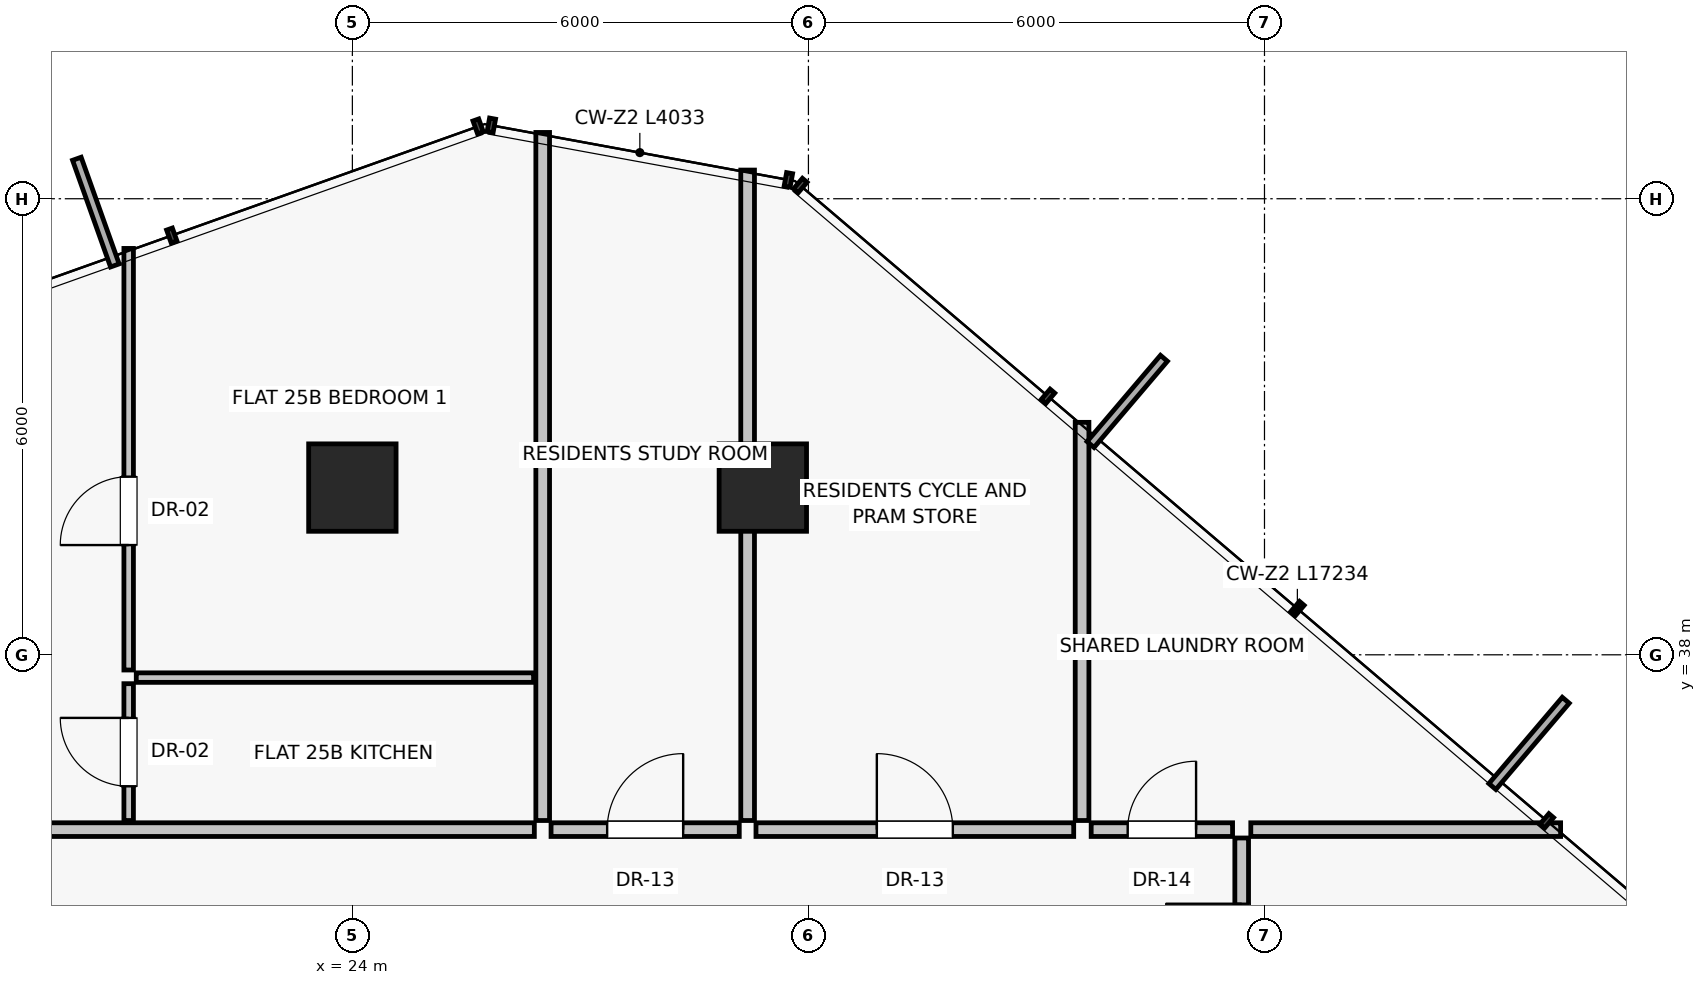
"""IFC4 building model, lengths in metres.
Left out: names, types, materials, properties, quantities, classifications, styles, units other than length and angle.
Written with IfcOpenShell. Run it as: python <this file> out.ifc"""

import sys

from ifc_helpers import new_model, si_unit, direction, frame, frame_2d, origin, origin_2d, place, context, subcontext, project, spatial, rectangle, extrude, source, transform, mapped, element, fill, save


model = new_model("IFC4")
c1 = context("Model", 3, precision=1e-05, world=origin(), true_north=direction((0.0, 1.0)))
c2 = subcontext(c1, "Body", "Model", "MODEL_VIEW")
j1 = project(units=[si_unit("LENGTHUNIT", "METRE"), si_unit("PLANEANGLEUNIT", "RADIAN")], contexts=[c1])
p1 = place(None, origin())
s1 = spatial("IfcSite", under=j1, at=p1, CompositionType="ELEMENT")
p2 = place(p1, origin())
s2 = spatial("IfcBuilding", under=s1, at=p2, CompositionType="ELEMENT")
p3 = place(p2, frame((0.0, 0.0, 92.7)))
s3 = spatial("IfcBuildingStorey", under=s2, at=p3, CompositionType="ELEMENT", Elevation=92.7)
for number, where, z_axis, x_axis in (
    (1, (29.4, 40.2, 0.0), (0.0, 0.0, 1.0), (1.0, 0.0, 0.0)),
    (2, (24.0, 40.2, 0.0), (0.0, 0.0, 1.0), (1.0, 0.0, 0.0)),
):
    element("IfcColumn", number, at=place(p3, frame(where, z_axis=z_axis, x_axis=x_axis)), inside=s3, PredefinedType="COLUMN", context=c2, shape_type="SweptSolid", body=[
        extrude(rectangle(XDim=1.15, YDim=1.15, at=origin_2d()), origin(), (0.0, 0.0, 1.0), 3.25),
    ])
p4 = place(p3, frame((33.6, 35.82, 0.0), z_axis=(0.0, 0.0, 1.0), x_axis=(0.0, 1.0, 0.0)))
e3 = element("IfcWall", 3, at=p4, inside=s3, PredefinedType="PARTITIONING", context=c2, shape_type="SweptSolid", body=[
    extrude(rectangle(XDim=5.238, YDim=0.18, at=frame_2d((2.619, 0.0))), origin(), (0.0, 0.0, 1.0), 3.0),
])
p5 = place(p3, frame((14.51, 35.7, 0.0), z_axis=(0.0, 0.0, 1.0), x_axis=(1.0, 0.0, 0.0)))
e4 = element("IfcWall", 4, at=p5, inside=s3, PredefinedType="PARTITIONING", context=c2, shape_type="SweptSolid", body=[
    extrude(rectangle(XDim=11.884, YDim=0.18, at=frame_2d((5.942, 0.0))), origin(), (0.0, 0.0, 1.0), 2.58),
])
p6 = place(p5, frame((3.868, 0.0, 0.0)))
e5 = element("IfcOpeningElement", 5, at=p6, cuts=e4, PredefinedType="OPENING", context=c2, shape_type="SweptSolid", body=[
    extrude(rectangle(XDim=0.95, YDim=2.02, at=frame_2d((0.475, 1.01))), frame((0.0, 0.1, 0.0), z_axis=(0.0, -1.0, 0.0), x_axis=(1.0, 0.0, 0.0)), (0.0, 0.0, 1.0), 0.2),
])
p7 = place(p3, frame((21.057, 35.82, 0.0), z_axis=(0.0, 0.0, 1.0), x_axis=(0.0, 1.0, 0.0)))
e6 = element("IfcWall", 6, at=p7, inside=s3, PredefinedType="PARTITIONING", context=c2, shape_type="SweptSolid", body=[
    extrude(rectangle(XDim=1.8, YDim=0.125, at=frame_2d((0.9, 0.0))), origin(), (0.0, 0.0, 1.0), 3.0),
])
p8 = place(p7, frame((0.45, 0.0, 0.0)))
e7 = element("IfcOpeningElement", 7, at=p8, cuts=e6, PredefinedType="OPENING", context=c2, shape_type="SweptSolid", body=[
    extrude(rectangle(XDim=0.9, YDim=2.01, at=frame_2d((0.45, 1.005))), frame((0.0, 0.073, 0.0), z_axis=(0.0, -1.0, 0.0), x_axis=(1.0, 0.0, 0.0)), (0.0, 0.0, 1.0), 0.145),
])
p9 = place(p3, frame((21.157, 37.7, 0.0), z_axis=(0.0, 0.0, 1.0), x_axis=(1.0, 0.0, 0.0)))
e8 = element("IfcWall", 8, at=p9, inside=s3, PredefinedType="PARTITIONING", context=c2, shape_type="SweptSolid", body=[
    extrude(rectangle(XDim=5.227, YDim=0.125, at=frame_2d((2.614, 0.0))), origin(), (0.0, 0.0, 1.0), 3.0),
])
p10 = place(p3, frame((21.057, 37.8, 0.0), z_axis=(0.0, 0.0, 1.0), x_axis=(0.0, 1.0, 0.0)))
e9 = element("IfcWall", 9, at=p10, inside=s3, PredefinedType="PARTITIONING", context=c2, shape_type="SweptSolid", body=[
    extrude(rectangle(XDim=5.546, YDim=0.125, at=frame_2d((2.773, 0.0))), origin(), (0.0, 0.0, 1.0), 3.0),
])
p11 = place(p10, frame((1.644, 0.0, 0.0)))
e10 = element("IfcOpeningElement", 10, at=p11, cuts=e9, PredefinedType="OPENING", context=c2, shape_type="SweptSolid", body=[
    extrude(rectangle(XDim=0.9, YDim=2.01, at=frame_2d((0.45, 1.005))), frame((0.0, 0.073, 0.0), z_axis=(0.0, -1.0, 0.0), x_axis=(1.0, 0.0, 0.0)), (0.0, 0.0, 1.0), 0.145),
])
p12 = place(p3, frame((26.504, 35.82, 0.0), z_axis=(0.0, 0.0, 1.0), x_axis=(0.0, 1.0, 0.0)))
e11 = element("IfcWall", 11, at=p12, inside=s3, PredefinedType="PARTITIONING", context=c2, shape_type="SweptSolid", body=[
    extrude(rectangle(XDim=9.052, YDim=0.18, at=frame_2d((4.526, 0.0))), origin(), (0.0, 0.0, 1.0), 3.0),
])
p13 = place(p3, frame((26.614, 35.7, 0.0), z_axis=(0.0, 0.0, 1.0), x_axis=(1.0, 0.0, 0.0)))
e12 = element("IfcWall", 12, at=p13, inside=s3, PredefinedType="PARTITIONING", context=c2, shape_type="SweptSolid", body=[
    extrude(rectangle(XDim=2.476, YDim=0.18, at=frame_2d((1.238, 0.0))), origin(), (0.0, 0.0, 1.0), 2.58),
])
p14 = place(p13, frame((0.738, 0.0, 0.0)))
e13 = element("IfcOpeningElement", 13, at=p14, cuts=e12, PredefinedType="OPENING", context=c2, shape_type="SweptSolid", body=[
    extrude(rectangle(XDim=1.0, YDim=2.01, at=frame_2d((0.5, 1.005))), frame((0.0, 0.1, 0.0), z_axis=(0.0, -1.0, 0.0), x_axis=(1.0, 0.0, 0.0)), (0.0, 0.0, 1.0), 0.2),
])
p15 = place(p3, frame((29.31, 35.7, 0.0), z_axis=(0.0, 0.0, 1.0), x_axis=(1.0, 0.0, 0.0)))
e14 = element("IfcWall", 14, at=p15, inside=s3, PredefinedType="PARTITIONING", context=c2, shape_type="SweptSolid", body=[
    extrude(rectangle(XDim=4.18, YDim=0.18, at=frame_2d((2.09, 0.0))), origin(), (0.0, 0.0, 1.0), 2.58),
])
p16 = place(p15, frame((1.59, 0.0, 0.0)))
e15 = element("IfcOpeningElement", 15, at=p16, cuts=e14, PredefinedType="OPENING", context=c2, shape_type="SweptSolid", body=[
    extrude(rectangle(XDim=1.0, YDim=2.01, at=frame_2d((0.5, 1.005))), frame((0.0, 0.1, 0.0), z_axis=(0.0, -1.0, 0.0), x_axis=(1.0, 0.0, 0.0)), (0.0, 0.0, 1.0), 0.2),
])
p17 = place(p3, frame((29.2, 35.82, 0.0), z_axis=(0.0, 0.0, 1.0), x_axis=(0.0, 1.0, 0.0)))
e16 = element("IfcWall", 16, at=p17, inside=s3, PredefinedType="PARTITIONING", context=c2, shape_type="SweptSolid", body=[
    extrude(rectangle(XDim=8.557, YDim=0.18, at=frame_2d((4.279, 0.0))), origin(), (0.0, 0.0, 1.0), 2.378),
])
p18 = place(p3, frame((35.82, 35.7, 0.0), z_axis=(0.0, 0.0, 1.0), x_axis=(1.0, 0.0, 0.0)))
e17 = element("IfcWall", 17, at=p18, inside=s3, PredefinedType="PARTITIONING", context=c2, shape_type="SweptSolid", body=[
    extrude(rectangle(XDim=4.076, YDim=0.18, at=frame_2d((2.038, 0.0))), origin(), (0.0, 0.0, 1.0), 3.0),
])
p19 = place(p3, frame((35.7, 32.86, 0.0), z_axis=(0.0, 0.0, 1.0), x_axis=(0.0, 1.0, 0.0)))
e18 = element("IfcWall", 18, at=p19, inside=s3, PredefinedType="PARTITIONING", context=c2, shape_type="SweptSolid", body=[
    extrude(rectangle(XDim=2.73, YDim=0.18, at=frame_2d((1.365, 0.0))), origin(), (0.0, 0.0, 1.0), 3.0),
])
p20 = place(p19, frame((0.865, 0.0, 0.0)))
e19 = element("IfcOpeningElement", 19, at=p20, cuts=e18, PredefinedType="OPENING", context=c2, shape_type="SweptSolid", body=[
    extrude(rectangle(XDim=1.0, YDim=2.01, at=frame_2d((0.5, 1.005))), frame((0.0, 0.1, 0.0), z_axis=(0.0, -1.0, 0.0), x_axis=(1.0, 0.0, 0.0)), (0.0, 0.0, 1.0), 0.2),
])
p21 = place(p3, frame((33.72, 35.7, 0.0), z_axis=(0.0, 0.0, 1.0), x_axis=(1.0, 0.0, 0.0)))
e20 = element("IfcWall", 20, at=p21, inside=s3, PredefinedType="PARTITIONING", context=c2, shape_type="SweptSolid", body=[
    extrude(rectangle(XDim=1.86, YDim=0.18, at=frame_2d((0.93, 0.0))), origin(), (0.0, 0.0, 1.0), 3.0),
])
p22 = place(p21, frame((0.48, 0.0, 0.0)))
e21 = element("IfcOpeningElement", 21, at=p22, cuts=e20, PredefinedType="OPENING", context=c2, shape_type="SweptSolid", body=[
    extrude(rectangle(XDim=0.9, YDim=2.01, at=frame_2d((0.45, 1.005))), frame((0.0, 0.1, 0.0), z_axis=(0.0, -1.0, 0.0), x_axis=(1.0, 0.0, 0.0)), (0.0, 0.0, 1.0), 0.2),
])
m1 = source(origin(), c2, "Body", "SweptSolid", [
    extrude(rectangle(XDim=0.9, YDim=2.01, at=frame_2d((0.45, 1.005))), frame((0.0, 0.025, 0.0), z_axis=(0.0, -1.0, 0.0), x_axis=(1.0, 0.0, 0.0)), (0.0, 0.0, 1.0), 0.05),
])
p23 = place(p8, origin())
e22 = element("IfcDoor", 22, at=p23, inside=s3, OperationType="SINGLE_SWING_RIGHT", PredefinedType="DOOR", context=c2, shape_type="MappedRepresentation", body=[
    mapped(m1, transform((0.0, 0.0, 0.0), scale=1.0)),
])
fill(e7, e22)
p24 = place(p11, origin())
e23 = element("IfcDoor", 23, at=p24, inside=s3, OperationType="SINGLE_SWING_LEFT", PredefinedType="DOOR", context=c2, shape_type="MappedRepresentation", body=[
    mapped(m1, transform((0.0, 0.0, 0.0), scale=1.0)),
])
fill(e10, e23)
m2 = source(origin(), c2, "Body", "SweptSolid", [
    extrude(rectangle(XDim=1.0, YDim=2.01, at=frame_2d((0.5, 1.005))), frame((0.0, 0.025, 0.0), z_axis=(0.0, -1.0, 0.0), x_axis=(1.0, 0.0, 0.0)), (0.0, 0.0, 1.0), 0.05),
])
p25 = place(p14, origin())
e24 = element("IfcDoor", 24, at=p25, inside=s3, OperationType="SINGLE_SWING_RIGHT", PredefinedType="DOOR", context=c2, shape_type="MappedRepresentation", body=[
    mapped(m2, transform((0.0, 0.0, 0.0), scale=1.0)),
])
fill(e13, e24)
p26 = place(p16, origin())
e25 = element("IfcDoor", 25, at=p26, inside=s3, OperationType="SINGLE_SWING_LEFT", PredefinedType="DOOR", context=c2, shape_type="MappedRepresentation", body=[
    mapped(m2, transform((0.0, 0.0, 0.0), scale=1.0)),
])
fill(e15, e25)
p27 = place(p20, origin())
e26 = element("IfcDoor", 26, at=p27, inside=s3, OperationType="SINGLE_SWING_RIGHT", PredefinedType="DOOR", context=c2, shape_type="MappedRepresentation", body=[
    mapped(m2, transform((0.0, 0.0, 0.0), scale=1.0)),
])
fill(e19, e26)
p28 = place(p22, origin())
e27 = element("IfcDoor", 27, at=p28, inside=s3, OperationType="SINGLE_SWING_RIGHT", PredefinedType="DOOR", context=c2, shape_type="MappedRepresentation", body=[
    mapped(m1, transform((0.0, 0.0, 0.0), scale=1.0)),
])
fill(e21, e27)
save(model, sys.argv[1])
